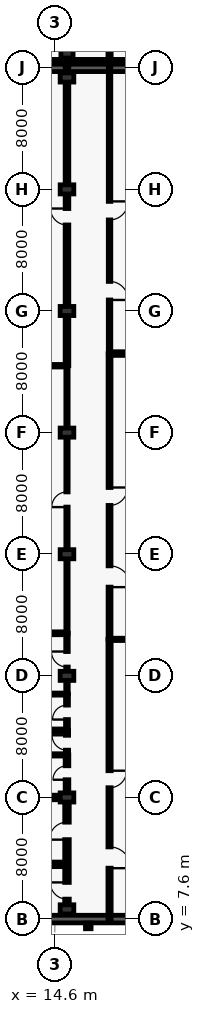
"""IFC4 building model, lengths in metres.
Left out: names, types, materials, properties, quantities, classifications, styles, units other than length and angle.
Written with IfcOpenShell. Run it as: python <this file> out.ifc"""

import sys

from ifc_helpers import new_model, si_unit, direction, frame, frame_2d, origin, origin_2d, place, context, subcontext, project, spatial, rectangle, i_section, extrude, element, fill, save


model = new_model("IFC4")
c1 = context("Model", 3, precision=1e-05, world=origin(), true_north=direction((0.0, 1.0)))
c2 = subcontext(c1, "Body", "Model", "MODEL_VIEW")
j1 = project(units=[si_unit("LENGTHUNIT", "METRE"), si_unit("PLANEANGLEUNIT", "RADIAN")], contexts=[c1])
p1 = place(None, origin())
s1 = spatial("IfcSite", under=j1, at=p1, CompositionType="ELEMENT")
p2 = place(p1, origin())
s2 = spatial("IfcBuilding", under=s1, at=p2, CompositionType="ELEMENT")
p3 = place(p2, frame((0.0, 0.0, -4.8)))
s3 = spatial("IfcBuildingStorey", under=s2, at=p3, CompositionType="ELEMENT", Elevation=-4.8)
for number, where, z_axis, x_axis in (
    (1, (15.4, 8.24, 0.0), (0.0, 0.0, 1.0), (1.0, 0.0, 0.0)),
    (2, (15.4, 15.6, 0.0), (0.0, 0.0, 1.0), (1.0, 0.0, 0.0)),
    (3, (15.4, 23.6, 0.0), (0.0, 0.0, 1.0), (1.0, 0.0, 0.0)),
    (4, (15.4, 31.6, 0.0), (0.0, 0.0, 1.0), (1.0, 0.0, 0.0)),
    (5, (15.4, 39.6, 0.0), (0.0, 0.0, 1.0), (1.0, 0.0, 0.0)),
    (6, (15.4, 47.6, 0.0), (0.0, 0.0, 1.0), (1.0, 0.0, 0.0)),
    (7, (15.4, 55.6, 0.0), (0.0, 0.0, 1.0), (1.0, 0.0, 0.0)),
    (8, (15.4, 62.96, 0.0), (0.0, 0.0, 1.0), (1.0, 0.0, 0.0)),
):
    element("IfcColumn", number, at=place(p3, frame(where, z_axis=z_axis, x_axis=x_axis)), inside=s3, PredefinedType="COLUMN", context=c2, shape_type="SweptSolid", body=[
        extrude(rectangle(XDim=0.6, YDim=0.9, at=origin_2d()), origin(), (0.0, 0.0, 1.0), 4.8),
    ])
p4 = place(p3, frame((15.4, 64.64, 0.0), z_axis=(0.0, 0.0, 1.0), x_axis=(1.0, 0.0, 0.0)))
e9 = element("IfcColumn", 9, at=p4, inside=s3, PredefinedType="COLUMN", context=c2, shape_type="SweptSolid", body=[
    extrude(rectangle(XDim=0.8, YDim=0.8, at=origin_2d()), origin(), (0.0, 0.0, 1.0), 4.8),
])
p5 = place(p3, frame((16.8, 7.15, -0.45), z_axis=(0.0, 0.0, 1.0), x_axis=(1.0, 0.0, 0.0)))
e10 = element("IfcColumn", 10, at=p5, inside=s3, PredefinedType="COLUMN", context=c2, shape_type="SweptSolid", body=[
    extrude(i_section(OverallWidth=0.373, OverallDepth=0.368, WebThickness=0.014, FlangeThickness=0.024, at=origin_2d()), origin(), (0.0, 0.0, 1.0), 5.25),
])
for number, where, z_axis, x_axis in (
    (11, (8.0, 63.6, 0.0), (0.0, 0.0, 1.0), (1.0, 0.0, 0.0)),
    (12, (46.0, 7.6, 0.0), (0.0, 0.0, 1.0), (-1.0, 0.0, 0.0)),
):
    element("IfcWall", number, at=place(p3, frame(where, z_axis=z_axis, x_axis=x_axis)), inside=s3, PredefinedType="USERDEFINED", context=c2, shape_type="SweptSolid", body=[
        extrude(rectangle(XDim=38.0, YDim=0.5, at=frame_2d((19.0, 0.0))), origin(), (0.0, 0.0, 1.0), 4.5),
    ])
p6 = place(p3, frame((40.2, 64.0, 0.0), z_axis=(0.0, 0.0, 1.0), x_axis=(-1.0, 0.0, 0.0)))
e13 = element("IfcWall", 13, at=p6, inside=s3, PredefinedType="SHEAR", context=c2, shape_type="SweptSolid", body=[
    extrude(rectangle(XDim=32.2, YDim=0.3, at=frame_2d((16.1, 0.0))), origin(), (0.0, 0.0, 1.0), 4.5),
])
p7 = place(p3, frame((15.4, 64.15, 0.0), z_axis=(0.0, 0.0, 1.0), x_axis=(0.0, 1.0, 0.0)))
e14 = element("IfcWall", 14, at=p7, inside=s3, PredefinedType="SHEAR", context=c2, shape_type="SweptSolid", body=[
    extrude(rectangle(XDim=7.048, YDim=0.3, at=frame_2d((3.524, 0.0))), origin(), (0.0, 0.0, 1.0), 4.5),
])
p8 = place(p7, frame((1.1, 0.0, 0.0)))
e15 = element("IfcOpeningElement", 15, at=p8, cuts=e14, PredefinedType="OPENING", context=c2, shape_type="SweptSolid", body=[
    extrude(rectangle(XDim=1.1, YDim=2.15, at=frame_2d((0.55, 1.075))), frame((0.0, 0.16, 0.0), z_axis=(0.0, -1.0, 0.0), x_axis=(1.0, 0.0, 0.0)), (0.0, 0.0, 1.0), 0.32),
])
p9 = place(p7, frame((4.875, 0.0, 0.0)))
e16 = element("IfcOpeningElement", 16, at=p9, cuts=e14, PredefinedType="OPENING", context=c2, shape_type="SweptSolid", body=[
    extrude(rectangle(XDim=1.15, YDim=2.2, at=frame_2d((0.575, 1.1))), frame((0.0, 0.16, 0.0), z_axis=(0.0, -1.0, 0.0), x_axis=(1.0, 0.0, 0.0)), (0.0, 0.0, 1.0), 0.32),
])
p10 = place(p3, frame((7.85, 15.6, 0.0), z_axis=(0.0, 0.0, 1.0), x_axis=(1.0, 0.0, 0.0)))
e17 = element("IfcWall", 17, at=p10, inside=s3, PredefinedType="SHEAR", context=c2, shape_type="SweptSolid", body=[
    extrude(rectangle(XDim=7.248, YDim=0.3, at=frame_2d((3.624, 0.0))), origin(), (0.0, 0.0, 1.0), 4.5),
])
p11 = place(p3, frame((15.4, 8.692, 0.0), z_axis=(0.0, 0.0, 1.0), x_axis=(0.0, 1.0, 0.0)))
e18 = element("IfcWall", 18, at=p11, inside=s3, PredefinedType="SHEAR", context=c2, shape_type="SweptSolid", body=[
    extrude(rectangle(XDim=6.456, YDim=0.3, at=frame_2d((3.228, 0.0))), origin(), (0.0, 0.0, 1.0), 4.5),
])
p12 = place(p11, frame((0.22, 0.0, 0.0)))
e19 = element("IfcOpeningElement", 19, at=p12, cuts=e18, PredefinedType="OPENING", context=c2, shape_type="SweptSolid", body=[
    extrude(rectangle(XDim=1.1, YDim=2.15, at=frame_2d((0.55, 1.075))), frame((0.0, 0.16, 0.0), z_axis=(0.0, -1.0, 0.0), x_axis=(1.0, 0.0, 0.0)), (0.0, 0.0, 1.0), 0.32),
])
p13 = place(p11, frame((4.133, 0.0, 0.0)))
e20 = element("IfcOpeningElement", 20, at=p13, cuts=e18, PredefinedType="OPENING", context=c2, shape_type="SweptSolid", body=[
    extrude(rectangle(XDim=1.15, YDim=2.2, at=frame_2d((0.575, 1.1))), frame((0.0, 0.16, 0.0), z_axis=(0.0, -1.0, 0.0), x_axis=(1.0, 0.0, 0.0)), (0.0, 0.0, 1.0), 0.32),
])
p14 = place(p3, frame((8.15, 11.2, 0.0), z_axis=(0.0, 0.0, 1.0), x_axis=(1.0, 0.0, 0.0)))
e21 = element("IfcWall", 21, at=p14, inside=s3, PredefinedType="SHEAR", context=c2, shape_type="SweptSolid", body=[
    extrude(rectangle(XDim=7.1, YDim=0.3, at=frame_2d((3.55, 0.0))), origin(), (0.0, 0.0, 1.0), 4.5),
])
p15 = place(p3, frame((15.4, 16.052, 0.0), z_axis=(0.0, 0.0, 1.0), x_axis=(0.0, 1.0, 0.0)))
e22 = element("IfcWall", 22, at=p15, inside=s3, PredefinedType="PARTITIONING", context=c2, shape_type="SweptSolid", body=[
    extrude(rectangle(XDim=2.348, YDim=0.24, at=frame_2d((1.174, 0.0))), origin(), (0.0, 0.0, 1.0), 3.65),
])
p16 = place(p15, frame((0.714, 0.0, 0.0)))
e23 = element("IfcOpeningElement", 23, at=p16, cuts=e22, PredefinedType="OPENING", context=c2, shape_type="SweptSolid", body=[
    extrude(rectangle(XDim=0.92, YDim=2.1, at=frame_2d((0.46, 1.05))), frame((0.0, 0.13, 0.0), z_axis=(0.0, -1.0, 0.0), x_axis=(1.0, 0.0, 0.0)), (0.0, 0.0, 1.0), 0.26),
])
p17 = place(p3, frame((15.4, 18.4, 0.0), z_axis=(0.0, 0.0, 1.0), x_axis=(0.0, 1.0, 0.0)))
e24 = element("IfcWall", 24, at=p17, inside=s3, PredefinedType="PARTITIONING", context=c2, shape_type="SweptSolid", body=[
    extrude(rectangle(XDim=1.6, YDim=0.21, at=frame_2d((0.8, 0.0))), origin(), (0.0, 0.0, 1.0), 3.65),
])
p18 = place(p17, frame((0.31, 0.0, 0.0)))
e25 = element("IfcOpeningElement", 25, at=p18, cuts=e24, PredefinedType="OPENING", context=c2, shape_type="SweptSolid", body=[
    extrude(rectangle(XDim=0.98, YDim=2.1, at=frame_2d((0.49, 1.05))), frame((0.0, 0.115, 0.0), z_axis=(0.0, -1.0, 0.0), x_axis=(1.0, 0.0, 0.0)), (0.0, 0.0, 1.0), 0.23),
])
p19 = place(p3, frame((15.4, 20.0, 0.0), z_axis=(0.0, 0.0, 1.0), x_axis=(0.0, 1.0, 0.0)))
e26 = element("IfcWall", 26, at=p19, inside=s3, PredefinedType="PARTITIONING", context=c2, shape_type="SweptSolid", body=[
    extrude(rectangle(XDim=2.4, YDim=0.19, at=frame_2d((1.2, 0.0))), origin(), (0.0, 0.0, 1.0), 3.65),
])
p20 = place(p19, frame((0.725, 0.0, 0.0)))
e27 = element("IfcOpeningElement", 27, at=p20, cuts=e26, PredefinedType="OPENING", context=c2, shape_type="SweptSolid", body=[
    extrude(rectangle(XDim=0.95, YDim=2.1, at=frame_2d((0.475, 1.05))), frame((0.0, 0.105, 0.0), z_axis=(0.0, -1.0, 0.0), x_axis=(1.0, 0.0, 0.0)), (0.0, 0.0, 1.0), 0.21),
])
p21 = place(p3, frame((15.4, 22.4, 0.0), z_axis=(0.0, 0.0, 1.0), x_axis=(0.0, 1.0, 0.0)))
e28 = element("IfcWall", 28, at=p21, inside=s3, PredefinedType="PARTITIONING", context=c2, shape_type="SweptSolid", body=[
    extrude(rectangle(XDim=4.0, YDim=0.165, at=frame_2d((2.0, 0.0))), origin(), (0.0, 0.0, 1.0), 3.65),
])
p22 = place(p21, frame((1.78, 0.0, 0.0)))
e29 = element("IfcOpeningElement", 29, at=p22, cuts=e28, PredefinedType="OPENING", context=c2, shape_type="SweptSolid", body=[
    extrude(rectangle(XDim=1.02, YDim=2.1, at=frame_2d((0.51, 1.05))), frame((0.0, 0.093, 0.0), z_axis=(0.0, -1.0, 0.0), x_axis=(1.0, 0.0, 0.0)), (0.0, 0.0, 1.0), 0.185),
])
p23 = place(p3, frame((15.4, 26.4, 0.0), z_axis=(0.0, 0.0, 1.0), x_axis=(0.0, 1.0, 0.0)))
e30 = element("IfcWall", 30, at=p23, inside=s3, PredefinedType="PARTITIONING", context=c2, shape_type="SweptSolid", body=[
    extrude(rectangle(XDim=17.6, YDim=0.15, at=frame_2d((8.8, 0.0))), origin(), (0.0, 0.0, 1.0), 3.65),
])
p24 = place(p23, frame((8.3, 0.0, 0.0)))
e31 = element("IfcOpeningElement", 31, at=p24, cuts=e30, PredefinedType="OPENING", context=c2, shape_type="SweptSolid", body=[
    extrude(rectangle(XDim=1.0, YDim=2.1, at=frame_2d((0.5, 1.05))), frame((0.0, 0.085, 0.0), z_axis=(0.0, -1.0, 0.0), x_axis=(1.0, 0.0, 0.0)), (0.0, 0.0, 1.0), 0.17),
])
p25 = place(p3, frame((15.4, 44.0, 0.0), z_axis=(0.0, 0.0, 1.0), x_axis=(0.0, 1.0, 0.0)))
e32 = element("IfcWall", 32, at=p25, inside=s3, PredefinedType="PARTITIONING", context=c2, shape_type="SweptSolid", body=[
    extrude(rectangle(XDim=19.6, YDim=0.24, at=frame_2d((9.8, 0.0))), origin(), (0.0, 0.0, 1.0), 3.65),
])
p26 = place(p25, frame((9.26, 0.0, 0.0)))
e33 = element("IfcOpeningElement", 33, at=p26, cuts=e32, PredefinedType="OPENING", context=c2, shape_type="SweptSolid", body=[
    extrude(rectangle(XDim=1.08, YDim=2.15, at=frame_2d((0.54, 1.075))), frame((0.0, 0.13, 0.0), z_axis=(0.0, -1.0, 0.0), x_axis=(1.0, 0.0, 0.0)), (0.0, 0.0, 1.0), 0.26),
])
p27 = place(p3, frame((18.2, 26.0, 0.0), z_axis=(0.0, 0.0, 1.0), x_axis=(0.0, -1.0, 0.0)))
e34 = element("IfcWall", 34, at=p27, inside=s3, PredefinedType="PARTITIONING", context=c2, shape_type="SweptSolid", body=[
    extrude(rectangle(XDim=18.4, YDim=0.21, at=frame_2d((9.2, 0.0))), origin(), (0.0, 0.0, 1.0), 4.5),
])
p28 = place(p27, frame((8.64, 0.0, 0.0)))
e35 = element("IfcOpeningElement", 35, at=p28, cuts=e34, PredefinedType="OPENING", context=c2, shape_type="SweptSolid", body=[
    extrude(rectangle(XDim=1.12, YDim=2.15, at=frame_2d((0.56, 1.075))), frame((0.0, 0.115, 0.0), z_axis=(0.0, -1.0, 0.0), x_axis=(1.0, 0.0, 0.0)), (0.0, 0.0, 1.0), 0.23),
])
p29 = place(p27, frame((13.652, 0.0, 0.0)))
e36 = element("IfcOpeningElement", 36, at=p29, cuts=e34, PredefinedType="OPENING", context=c2, shape_type="SweptSolid", body=[
    extrude(rectangle(XDim=1.4, YDim=2.25, at=frame_2d((0.7, 1.125))), frame((0.0, 0.115, 0.0), z_axis=(0.0, -1.0, 0.0), x_axis=(1.0, 0.0, 0.0)), (0.0, 0.0, 1.0), 0.23),
])
p30 = place(p3, frame((18.2, 44.8, 0.0), z_axis=(0.0, 0.0, 1.0), x_axis=(0.0, -1.0, 0.0)))
e37 = element("IfcWall", 37, at=p30, inside=s3, PredefinedType="PARTITIONING", context=c2, shape_type="SweptSolid", body=[
    extrude(rectangle(XDim=18.8, YDim=0.19, at=frame_2d((9.4, 0.0))), origin(), (0.0, 0.0, 1.0), 4.5),
])
p31 = place(p30, frame((8.81, 0.0, 0.0)))
e38 = element("IfcOpeningElement", 38, at=p31, cuts=e37, PredefinedType="OPENING", context=c2, shape_type="SweptSolid", body=[
    extrude(rectangle(XDim=1.18, YDim=2.15, at=frame_2d((0.59, 1.075))), frame((0.0, 0.105, 0.0), z_axis=(0.0, -1.0, 0.0), x_axis=(1.0, 0.0, 0.0)), (0.0, 0.0, 1.0), 0.21),
])
p32 = place(p30, frame((13.964, 0.0, 0.0)))
e39 = element("IfcOpeningElement", 39, at=p32, cuts=e37, PredefinedType="OPENING", context=c2, shape_type="SweptSolid", body=[
    extrude(rectangle(XDim=1.4, YDim=2.25, at=frame_2d((0.7, 1.125))), frame((0.0, 0.105, 0.0), z_axis=(0.0, -1.0, 0.0), x_axis=(1.0, 0.0, 0.0)), (0.0, 0.0, 1.0), 0.21),
])
p33 = place(p3, frame((18.2, 63.6, 0.0), z_axis=(0.0, 0.0, 1.0), x_axis=(0.0, -1.0, 0.0)))
e40 = element("IfcWall", 40, at=p33, inside=s3, PredefinedType="PARTITIONING", context=c2, shape_type="SweptSolid", body=[
    extrude(rectangle(XDim=18.8, YDim=0.165, at=frame_2d((9.4, 0.0))), origin(), (0.0, 0.0, 1.0), 4.5),
])
p34 = place(p33, frame((8.79, 0.0, 0.0)))
e41 = element("IfcOpeningElement", 41, at=p34, cuts=e40, PredefinedType="OPENING", context=c2, shape_type="SweptSolid", body=[
    extrude(rectangle(XDim=1.22, YDim=2.2, at=frame_2d((0.61, 1.1))), frame((0.0, 0.093, 0.0), z_axis=(0.0, -1.0, 0.0), x_axis=(1.0, 0.0, 0.0)), (0.0, 0.0, 1.0), 0.185),
])
p35 = place(p33, frame((14.054, 0.0, 0.0)))
e42 = element("IfcOpeningElement", 42, at=p35, cuts=e40, PredefinedType="OPENING", context=c2, shape_type="SweptSolid", body=[
    extrude(rectangle(XDim=1.22, YDim=2.2, at=frame_2d((0.61, 1.1))), frame((0.0, 0.093, 0.0), z_axis=(0.0, -1.0, 0.0), x_axis=(1.0, 0.0, 0.0)), (0.0, 0.0, 1.0), 0.185),
])
p36 = place(p3, frame((12.0, 18.4, 0.0), z_axis=(0.0, 0.0, 1.0), x_axis=(1.0, 0.0, 0.0)))
e43 = element("IfcWall", 43, at=p36, inside=s3, PredefinedType="PARTITIONING", context=c2, shape_type="SweptSolid", body=[
    extrude(rectangle(XDim=3.4, YDim=0.15, at=frame_2d((1.7, 0.0))), origin(), (0.0, 0.0, 1.0), 4.5),
])
p37 = place(p3, frame((8.0, 20.0, 0.0), z_axis=(0.0, 0.0, 1.0), x_axis=(1.0, 0.0, 0.0)))
e44 = element("IfcWall", 44, at=p37, inside=s3, PredefinedType="PARTITIONING", context=c2, shape_type="SweptSolid", body=[
    extrude(rectangle(XDim=7.4, YDim=0.21, at=frame_2d((3.7, 0.0))), origin(), (0.0, 0.0, 1.0), 4.5),
])
p38 = place(p3, frame((8.0, 22.4, 0.0), z_axis=(0.0, 0.0, 1.0), x_axis=(1.0, 0.0, 0.0)))
e45 = element("IfcWall", 45, at=p38, inside=s3, PredefinedType="PARTITIONING", context=c2, shape_type="SweptSolid", body=[
    extrude(rectangle(XDim=7.4, YDim=0.135, at=frame_2d((3.7, 0.0))), origin(), (0.0, 0.0, 1.0), 4.5),
])
p39 = place(p3, frame((8.0, 26.4, 0.0), z_axis=(0.0, 0.0, 1.0), x_axis=(1.0, 0.0, 0.0)))
e46 = element("IfcWall", 46, at=p39, inside=s3, PredefinedType="PARTITIONING", context=c2, shape_type="SweptSolid", body=[
    extrude(rectangle(XDim=7.4, YDim=0.19, at=frame_2d((3.7, 0.0))), origin(), (0.0, 0.0, 1.0), 4.5),
])
p40 = place(p3, frame((8.0, 44.0, 0.0), z_axis=(0.0, 0.0, 1.0), x_axis=(1.0, 0.0, 0.0)))
e47 = element("IfcWall", 47, at=p40, inside=s3, PredefinedType="PARTITIONING", context=c2, shape_type="SweptSolid", body=[
    extrude(rectangle(XDim=7.4, YDim=0.165, at=frame_2d((3.7, 0.0))), origin(), (0.0, 0.0, 1.0), 4.5),
])
p41 = place(p3, frame((18.2, 26.0, 0.0), z_axis=(0.0, 0.0, 1.0), x_axis=(1.0, 0.0, 0.0)))
e48 = element("IfcWall", 48, at=p41, inside=s3, PredefinedType="PARTITIONING", context=c2, shape_type="SweptSolid", body=[
    extrude(rectangle(XDim=27.8, YDim=0.15, at=frame_2d((13.9, 0.0))), origin(), (0.0, 0.0, 1.0), 4.5),
])
p42 = place(p3, frame((18.2, 44.8, 0.0), z_axis=(0.0, 0.0, 1.0), x_axis=(1.0, 0.0, 0.0)))
e49 = element("IfcWall", 49, at=p42, inside=s3, PredefinedType="PARTITIONING", context=c2, shape_type="SweptSolid", body=[
    extrude(rectangle(XDim=27.8, YDim=0.24, at=frame_2d((13.9, 0.0))), origin(), (0.0, 0.0, 1.0), 4.5),
])
p43 = place(p3, frame((18.2, 79.0, 0.0), z_axis=(0.0, 0.0, 1.0), x_axis=(0.0, -1.0, 0.0)))
e50 = element("IfcWall", 50, at=p43, inside=s3, PredefinedType="PARTITIONING", context=c2, shape_type="SweptSolid", body=[
    extrude(rectangle(XDim=15.0, YDim=0.21, at=frame_2d((7.5, 0.0))), origin(), (0.0, 0.0, 1.0), 4.5),
])
p44 = place(p43, frame((6.625, 0.0, 0.0)))
e51 = element("IfcOpeningElement", 51, at=p44, cuts=e50, PredefinedType="OPENING", context=c2, shape_type="SweptSolid", body=[
    extrude(rectangle(XDim=1.75, YDim=2.35, at=frame_2d((0.875, 1.175))), frame((0.0, 0.115, 0.0), z_axis=(0.0, -1.0, 0.0), x_axis=(1.0, 0.0, 0.0)), (0.0, 0.0, 1.0), 0.23),
])
p45 = place(p43, frame((11.0, 0.0, 0.0)))
e52 = element("IfcOpeningElement", 52, at=p45, cuts=e50, PredefinedType="OPENING", context=c2, shape_type="SweptSolid", body=[
    extrude(rectangle(XDim=1.4, YDim=2.25, at=frame_2d((0.7, 1.125))), frame((0.0, 0.115, 0.0), z_axis=(0.0, -1.0, 0.0), x_axis=(1.0, 0.0, 0.0)), (0.0, 0.0, 1.0), 0.23),
])
p46 = place(p12, origin())
e53 = element("IfcDoor", 53, at=p46, inside=s3, OperationType="SINGLE_SWING_RIGHT", PredefinedType="DOOR", context=c2, shape_type="SweptSolid", body=[
    extrude(rectangle(XDim=1.1, YDim=2.15, at=frame_2d((0.55, 1.075))), frame((0.0, 0.025, 0.0), z_axis=(0.0, -1.0, 0.0), x_axis=(1.0, 0.0, 0.0)), (0.0, 0.0, 1.0), 0.05),
])
fill(e19, e53)
p47 = place(p13, origin())
e54 = element("IfcDoor", 54, at=p47, inside=s3, OperationType="SINGLE_SWING_LEFT", PredefinedType="DOOR", context=c2, shape_type="SweptSolid", body=[
    extrude(rectangle(XDim=1.15, YDim=2.2, at=frame_2d((0.575, 1.1))), frame((0.0, 0.025, 0.0), z_axis=(0.0, -1.0, 0.0), x_axis=(1.0, 0.0, 0.0)), (0.0, 0.0, 1.0), 0.05),
])
fill(e20, e54)
p48 = place(p16, origin())
e55 = element("IfcDoor", 55, at=p48, inside=s3, OperationType="SINGLE_SWING_LEFT", PredefinedType="DOOR", context=c2, shape_type="SweptSolid", body=[
    extrude(rectangle(XDim=0.92, YDim=2.1, at=frame_2d((0.46, 1.05))), frame((0.0, 0.025, 0.0), z_axis=(0.0, -1.0, 0.0), x_axis=(1.0, 0.0, 0.0)), (0.0, 0.0, 1.0), 0.05),
])
fill(e23, e55)
p49 = place(p18, origin())
e56 = element("IfcDoor", 56, at=p49, inside=s3, OperationType="SINGLE_SWING_RIGHT", PredefinedType="DOOR", context=c2, shape_type="SweptSolid", body=[
    extrude(rectangle(XDim=0.98, YDim=2.1, at=frame_2d((0.49, 1.05))), frame((0.0, 0.025, 0.0), z_axis=(0.0, -1.0, 0.0), x_axis=(1.0, 0.0, 0.0)), (0.0, 0.0, 1.0), 0.05),
])
fill(e25, e56)
p50 = place(p20, origin())
e57 = element("IfcDoor", 57, at=p50, inside=s3, OperationType="SINGLE_SWING_LEFT", PredefinedType="DOOR", context=c2, shape_type="SweptSolid", body=[
    extrude(rectangle(XDim=0.95, YDim=2.1, at=frame_2d((0.475, 1.05))), frame((0.0, 0.025, 0.0), z_axis=(0.0, -1.0, 0.0), x_axis=(1.0, 0.0, 0.0)), (0.0, 0.0, 1.0), 0.05),
])
fill(e27, e57)
p51 = place(p22, origin())
e58 = element("IfcDoor", 58, at=p51, inside=s3, OperationType="SINGLE_SWING_RIGHT", PredefinedType="DOOR", context=c2, shape_type="SweptSolid", body=[
    extrude(rectangle(XDim=1.02, YDim=2.1, at=frame_2d((0.51, 1.05))), frame((0.0, 0.025, 0.0), z_axis=(0.0, -1.0, 0.0), x_axis=(1.0, 0.0, 0.0)), (0.0, 0.0, 1.0), 0.05),
])
fill(e29, e58)
p52 = place(p24, origin())
e59 = element("IfcDoor", 59, at=p52, inside=s3, OperationType="SINGLE_SWING_LEFT", PredefinedType="DOOR", context=c2, shape_type="SweptSolid", body=[
    extrude(rectangle(XDim=1.0, YDim=2.1, at=frame_2d((0.5, 1.05))), frame((0.0, 0.025, 0.0), z_axis=(0.0, -1.0, 0.0), x_axis=(1.0, 0.0, 0.0)), (0.0, 0.0, 1.0), 0.05),
])
fill(e31, e59)
p53 = place(p26, origin())
e60 = element("IfcDoor", 60, at=p53, inside=s3, OperationType="SINGLE_SWING_RIGHT", PredefinedType="DOOR", context=c2, shape_type="SweptSolid", body=[
    extrude(rectangle(XDim=1.08, YDim=2.15, at=frame_2d((0.54, 1.075))), frame((0.0, 0.025, 0.0), z_axis=(0.0, -1.0, 0.0), x_axis=(1.0, 0.0, 0.0)), (0.0, 0.0, 1.0), 0.05),
])
fill(e33, e60)
p54 = place(p28, origin())
e61 = element("IfcDoor", 61, at=p54, inside=s3, OperationType="SINGLE_SWING_LEFT", PredefinedType="DOOR", context=c2, shape_type="SweptSolid", body=[
    extrude(rectangle(XDim=1.12, YDim=2.15, at=frame_2d((0.56, 1.075))), frame((0.0, 0.025, 0.0), z_axis=(0.0, -1.0, 0.0), x_axis=(1.0, 0.0, 0.0)), (0.0, 0.0, 1.0), 0.05),
])
fill(e35, e61)
p55 = place(p29, origin())
e62 = element("IfcDoor", 62, at=p55, inside=s3, OperationType="SINGLE_SWING_RIGHT", PredefinedType="DOOR", context=c2, shape_type="SweptSolid", body=[
    extrude(rectangle(XDim=1.4, YDim=2.25, at=frame_2d((0.7, 1.125))), frame((0.0, 0.025, 0.0), z_axis=(0.0, -1.0, 0.0), x_axis=(1.0, 0.0, 0.0)), (0.0, 0.0, 1.0), 0.05),
])
fill(e36, e62)
p56 = place(p31, origin())
e63 = element("IfcDoor", 63, at=p56, inside=s3, OperationType="SINGLE_SWING_LEFT", PredefinedType="DOOR", context=c2, shape_type="SweptSolid", body=[
    extrude(rectangle(XDim=1.18, YDim=2.15, at=frame_2d((0.59, 1.075))), frame((0.0, 0.025, 0.0), z_axis=(0.0, -1.0, 0.0), x_axis=(1.0, 0.0, 0.0)), (0.0, 0.0, 1.0), 0.05),
])
fill(e38, e63)
p57 = place(p32, origin())
e64 = element("IfcDoor", 64, at=p57, inside=s3, OperationType="SINGLE_SWING_RIGHT", PredefinedType="DOOR", context=c2, shape_type="SweptSolid", body=[
    extrude(rectangle(XDim=1.4, YDim=2.25, at=frame_2d((0.7, 1.125))), frame((0.0, 0.025, 0.0), z_axis=(0.0, -1.0, 0.0), x_axis=(1.0, 0.0, 0.0)), (0.0, 0.0, 1.0), 0.05),
])
fill(e39, e64)
p58 = place(p34, origin())
e65 = element("IfcDoor", 65, at=p58, inside=s3, OperationType="SINGLE_SWING_LEFT", PredefinedType="DOOR", context=c2, shape_type="SweptSolid", body=[
    extrude(rectangle(XDim=1.22, YDim=2.2, at=frame_2d((0.61, 1.1))), frame((0.0, 0.025, 0.0), z_axis=(0.0, -1.0, 0.0), x_axis=(1.0, 0.0, 0.0)), (0.0, 0.0, 1.0), 0.05),
])
fill(e41, e65)
p59 = place(p35, origin())
e66 = element("IfcDoor", 66, at=p59, inside=s3, OperationType="SINGLE_SWING_RIGHT", PredefinedType="DOOR", context=c2, shape_type="SweptSolid", body=[
    extrude(rectangle(XDim=1.22, YDim=2.2, at=frame_2d((0.61, 1.1))), frame((0.0, 0.025, 0.0), z_axis=(0.0, -1.0, 0.0), x_axis=(1.0, 0.0, 0.0)), (0.0, 0.0, 1.0), 0.05),
])
fill(e42, e66)
save(model, sys.argv[1])
